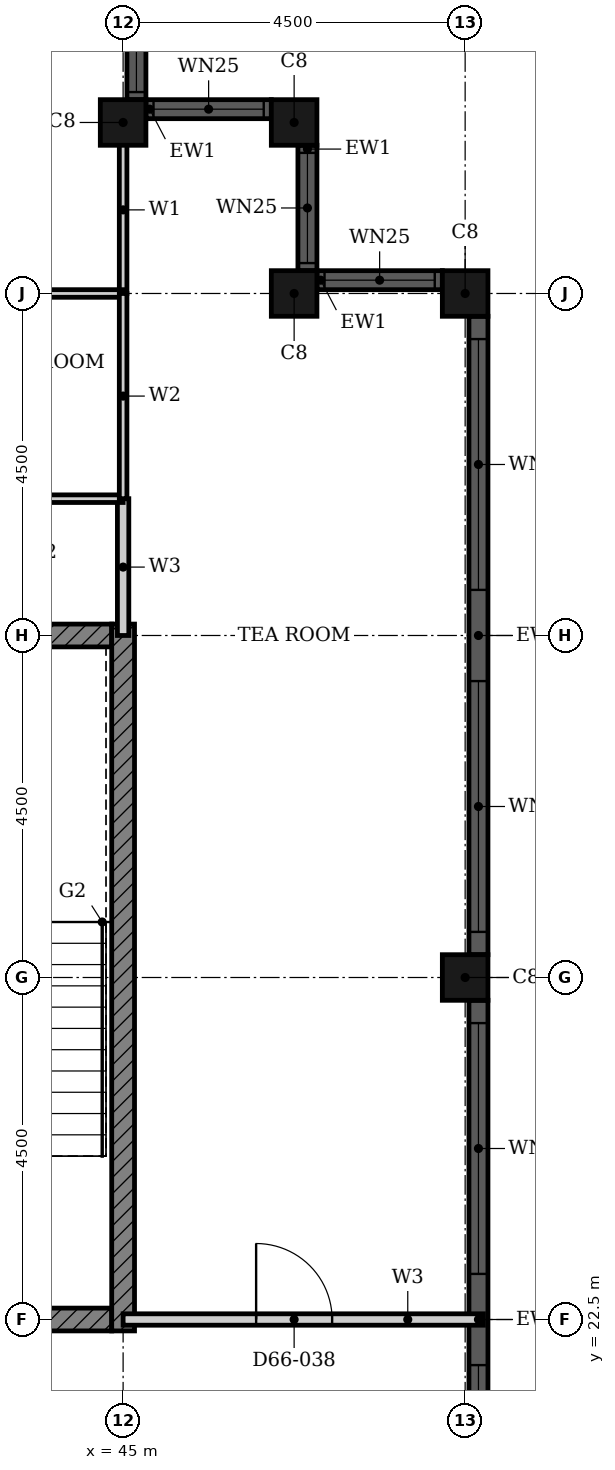
"""IFC4 building model, lengths in metres.
Left out: names, types, materials, properties, quantities, classifications, styles, units other than length and angle.
Written with IfcOpenShell. Run it as: python <this file> out.ifc"""

import sys

from ifc_helpers import new_model, si_unit, direction, frame, frame_2d, origin, origin_2d, place, context, subcontext, project, spatial, rectangle, hollow_rectangle, extrude, element, fill, save


model = new_model("IFC4")
c1 = context("Model", 3, precision=1e-05, world=origin(), true_north=direction((0.0, 1.0)))
c2 = subcontext(c1, "Body", "Model", "MODEL_VIEW")
j1 = project(units=[si_unit("LENGTHUNIT", "METRE"), si_unit("PLANEANGLEUNIT", "RADIAN")], contexts=[c1])
p1 = place(None, origin())
s1 = spatial("IfcSite", under=j1, at=p1, CompositionType="ELEMENT")
p2 = place(p1, origin())
s2 = spatial("IfcBuilding", under=s1, at=p2, CompositionType="ELEMENT")
p3 = place(p2, frame((0.0, 0.0, 260.1)))
s3 = spatial("IfcBuildingStorey", under=s2, at=p3, CompositionType="ELEMENT", Elevation=260.1)
for number, where, z_axis, x_axis in (
    (1, (49.5, 27.0, 0.0), (0.0, 0.0, 1.0), (1.0, 0.0, 0.0)),
    (2, (49.5, 36.0, 0.0), (0.0, 0.0, 1.0), (1.0, 0.0, 0.0)),
    (3, (47.25, 36.0, 0.0), (0.0, 0.0, 1.0), (1.0, 0.0, 0.0)),
    (4, (47.25, 38.25, 0.0), (0.0, 0.0, 1.0), (1.0, 0.0, 0.0)),
    (5, (45.0, 38.25, 0.0), (0.0, 0.0, 1.0), (1.0, 0.0, 0.0)),
):
    element("IfcColumn", number, at=place(p3, frame(where, z_axis=z_axis, x_axis=x_axis)), inside=s3, PredefinedType="COLUMN", context=c2, shape_type="SweptSolid", body=[
        extrude(hollow_rectangle(XDim=0.6, YDim=0.6, WallThickness=0.02, at=origin_2d()), origin(), (0.0, 0.0, 1.0), 3.7),
    ])
p4 = place(p3, frame((49.675, 18.3, 0.0), z_axis=(0.0, 0.0, 1.0), x_axis=(0.0, 1.0, 0.0)))
e6 = element("IfcWall", 6, at=p4, inside=s3, PredefinedType="SOLIDWALL", context=c2, shape_type="SweptSolid", body=[
    extrude(rectangle(XDim=8.4, YDim=0.25, at=frame_2d((4.2, 0.0))), origin(), (0.0, 0.0, 1.0), 3.7),
])
p5 = place(p4, frame((0.3, 0.0, 0.45)))
e7 = element("IfcOpeningElement", 7, at=p5, cuts=e6, PredefinedType="OPENING", context=c2, shape_type="SweptSolid", body=[
    extrude(rectangle(XDim=3.3, YDim=2.3, at=frame_2d((1.65, 1.15))), frame((0.0, 0.135, 0.0), z_axis=(0.0, -1.0, 0.0), x_axis=(1.0, 0.0, 0.0)), (0.0, 0.0, 1.0), 0.27),
])
p6 = place(p4, frame((4.8, 0.0, 0.45)))
e8 = element("IfcOpeningElement", 8, at=p6, cuts=e6, PredefinedType="OPENING", context=c2, shape_type="SweptSolid", body=[
    extrude(rectangle(XDim=3.3, YDim=2.3, at=frame_2d((1.65, 1.15))), frame((0.0, 0.135, 0.0), z_axis=(0.0, -1.0, 0.0), x_axis=(1.0, 0.0, 0.0)), (0.0, 0.0, 1.0), 0.27),
])
p7 = place(p3, frame((49.675, 27.3, 0.0), z_axis=(0.0, 0.0, 1.0), x_axis=(0.0, 1.0, 0.0)))
e9 = element("IfcWall", 9, at=p7, inside=s3, PredefinedType="SOLIDWALL", context=c2, shape_type="SweptSolid", body=[
    extrude(rectangle(XDim=8.4, YDim=0.25, at=frame_2d((4.2, 0.0))), origin(), (0.0, 0.0, 1.0), 3.7),
])
p8 = place(p7, frame((0.3, 0.0, 0.45)))
e10 = element("IfcOpeningElement", 10, at=p8, cuts=e9, PredefinedType="OPENING", context=c2, shape_type="SweptSolid", body=[
    extrude(rectangle(XDim=3.3, YDim=2.3, at=frame_2d((1.65, 1.15))), frame((0.0, 0.135, 0.0), z_axis=(0.0, -1.0, 0.0), x_axis=(1.0, 0.0, 0.0)), (0.0, 0.0, 1.0), 0.27),
])
p9 = place(p7, frame((4.8, 0.0, 0.45)))
e11 = element("IfcOpeningElement", 11, at=p9, cuts=e9, PredefinedType="OPENING", context=c2, shape_type="SweptSolid", body=[
    extrude(rectangle(XDim=3.3, YDim=2.3, at=frame_2d((1.65, 1.15))), frame((0.0, 0.135, 0.0), z_axis=(0.0, -1.0, 0.0), x_axis=(1.0, 0.0, 0.0)), (0.0, 0.0, 1.0), 0.27),
])
p10 = place(p3, frame((49.2, 36.175, 0.0), z_axis=(0.0, 0.0, 1.0), x_axis=(-1.0, 0.0, 0.0)))
e12 = element("IfcWall", 12, at=p10, inside=s3, PredefinedType="SOLIDWALL", context=c2, shape_type="SweptSolid", body=[
    extrude(rectangle(XDim=1.65, YDim=0.25, at=frame_2d((0.825, 0.0))), origin(), (0.0, 0.0, 1.0), 3.7),
])
p11 = place(p10, frame((0.1, 0.0, 0.9)))
e13 = element("IfcOpeningElement", 13, at=p11, cuts=e12, PredefinedType="OPENING", context=c2, shape_type="SweptSolid", body=[
    extrude(rectangle(XDim=1.45, YDim=1.85, at=frame_2d((0.725, 0.925))), frame((0.0, 0.135, 0.0), z_axis=(0.0, -1.0, 0.0), x_axis=(1.0, 0.0, 0.0)), (0.0, 0.0, 1.0), 0.27),
])
p12 = place(p3, frame((47.425, 36.3, 0.0), z_axis=(0.0, 0.0, 1.0), x_axis=(0.0, 1.0, 0.0)))
e14 = element("IfcWall", 14, at=p12, inside=s3, PredefinedType="SOLIDWALL", context=c2, shape_type="SweptSolid", body=[
    extrude(rectangle(XDim=1.65, YDim=0.25, at=frame_2d((0.825, 0.0))), origin(), (0.0, 0.0, 1.0), 3.7),
])
p13 = place(p12, frame((0.1, 0.0, 0.9)))
e15 = element("IfcOpeningElement", 15, at=p13, cuts=e14, PredefinedType="OPENING", context=c2, shape_type="SweptSolid", body=[
    extrude(rectangle(XDim=1.45, YDim=1.85, at=frame_2d((0.725, 0.925))), frame((0.0, 0.135, 0.0), z_axis=(0.0, -1.0, 0.0), x_axis=(1.0, 0.0, 0.0)), (0.0, 0.0, 1.0), 0.27),
])
p14 = place(p3, frame((46.95, 38.425, 0.0), z_axis=(0.0, 0.0, 1.0), x_axis=(-1.0, 0.0, 0.0)))
e16 = element("IfcWall", 16, at=p14, inside=s3, PredefinedType="SOLIDWALL", context=c2, shape_type="SweptSolid", body=[
    extrude(rectangle(XDim=1.65, YDim=0.25, at=frame_2d((0.825, 0.0))), origin(), (0.0, 0.0, 1.0), 3.7),
])
p15 = place(p14, frame((0.1, 0.0, 0.9)))
e17 = element("IfcOpeningElement", 17, at=p15, cuts=e16, PredefinedType="OPENING", context=c2, shape_type="SweptSolid", body=[
    extrude(rectangle(XDim=1.45, YDim=1.85, at=frame_2d((0.725, 0.925))), frame((0.0, 0.135, 0.0), z_axis=(0.0, -1.0, 0.0), x_axis=(1.0, 0.0, 0.0)), (0.0, 0.0, 1.0), 0.27),
])
p16 = place(p3, frame((45.175, 38.55, 0.0), z_axis=(0.0, 0.0, 1.0), x_axis=(0.0, 1.0, 0.0)))
e18 = element("IfcWall", 18, at=p16, inside=s3, PredefinedType="SOLIDWALL", context=c2, shape_type="SweptSolid", body=[
    extrude(rectangle(XDim=1.65, YDim=0.25, at=frame_2d((0.825, 0.0))), origin(), (0.0, 0.0, 1.0), 3.7),
])
p17 = place(p16, frame((0.1, 0.0, 0.9)))
e19 = element("IfcOpeningElement", 19, at=p17, cuts=e18, PredefinedType="OPENING", context=c2, shape_type="SweptSolid", body=[
    extrude(rectangle(XDim=1.45, YDim=1.85, at=frame_2d((0.725, 0.925))), frame((0.0, 0.135, 0.0), z_axis=(0.0, -1.0, 0.0), x_axis=(1.0, 0.0, 0.0)), (0.0, 0.0, 1.0), 0.27),
])
p18 = place(p3, frame((30.339, 22.5, 0.0), z_axis=(0.0, 0.0, 1.0), x_axis=(1.0, 0.0, 0.0)))
e20 = element("IfcWall", 20, at=p18, inside=s3, PredefinedType="SHEAR", context=c2, shape_type="SweptSolid", body=[
    extrude(rectangle(XDim=14.511, YDim=0.3, at=frame_2d((7.255, 0.0))), origin(), (0.0, 0.0, 1.0), 3.4),
])
p19 = place(p18, frame((7.975, 0.0, 0.0)))
e21 = element("IfcOpeningElement", 21, at=p19, cuts=e20, PredefinedType="OPENING", context=c2, shape_type="SweptSolid", body=[
    extrude(rectangle(XDim=1.8, YDim=2.1, at=frame_2d((0.9, 1.05))), frame((0.0, 0.16, 0.0), z_axis=(0.0, -1.0, 0.0), x_axis=(1.0, 0.0, 0.0)), (0.0, 0.0, 1.0), 0.32),
])
p20 = place(p3, frame((40.625, 31.5, 0.0), z_axis=(0.0, 0.0, 1.0), x_axis=(1.0, 0.0, 0.0)))
e22 = element("IfcWall", 22, at=p20, inside=s3, PredefinedType="SHEAR", context=c2, shape_type="SweptSolid", body=[
    extrude(rectangle(XDim=4.225, YDim=0.3, at=frame_2d((2.113, 0.0))), origin(), (0.0, 0.0, 1.0), 3.4),
])
p21 = place(p3, frame((45.0, 22.35, 0.0), z_axis=(0.0, 0.0, 1.0), x_axis=(0.0, 1.0, 0.0)))
e23 = element("IfcWall", 23, at=p21, inside=s3, PredefinedType="SHEAR", context=c2, shape_type="SweptSolid", body=[
    extrude(rectangle(XDim=9.3, YDim=0.3, at=frame_2d((4.65, 0.0))), origin(), (0.0, 0.0, 1.0), 3.4),
])
p22 = place(p3, frame((45.0, 22.5, 0.0), z_axis=(0.0, 0.0, 1.0), x_axis=(1.0, 0.0, 0.0)))
e24 = element("IfcWall", 24, at=p22, inside=s3, PredefinedType="PARTITIONING", context=c2, shape_type="SweptSolid", body=[
    extrude(rectangle(XDim=4.74, YDim=0.15, at=frame_2d((2.37, 0.0))), origin(), (0.0, 0.0, 1.0), 3.4),
])
p23 = place(p22, frame((1.75, 0.0, 0.0)))
e25 = element("IfcOpeningElement", 25, at=p23, cuts=e24, PredefinedType="OPENING", context=c2, shape_type="SweptSolid", body=[
    extrude(rectangle(XDim=1.0, YDim=2.1, at=frame_2d((0.5, 1.05))), frame((0.0, 0.085, 0.0), z_axis=(0.0, -1.0, 0.0), x_axis=(1.0, 0.0, 0.0)), (0.0, 0.0, 1.0), 0.17),
])
p24 = place(p3, frame((45.0, 31.5, 0.0), z_axis=(0.0, 0.0, 1.0), x_axis=(0.0, 1.0, 0.0)))
e26 = element("IfcWall", 26, at=p24, inside=s3, PredefinedType="PARTITIONING", context=c2, shape_type="SweptSolid", body=[
    extrude(rectangle(XDim=1.8, YDim=0.15, at=frame_2d((0.9, 0.0))), origin(), (0.0, 0.0, 1.0), 3.4),
])
p25 = place(p3, frame((45.0, 36.0, 0.0), z_axis=(0.0, 0.0, 1.0), x_axis=(0.0, 1.0, 0.0)))
e27 = element("IfcWall", 27, at=p25, inside=s3, PredefinedType="PARTITIONING", context=c2, shape_type="SweptSolid", body=[
    extrude(rectangle(XDim=2.2, YDim=0.1, at=frame_2d((1.1, 0.0))), origin(), (0.0, 0.0, 1.0), 3.4),
])
for number, where, z_axis, x_axis in (
    (28, (42.6, 33.3, 0.0), (0.0, 0.0, 1.0), (1.0, 0.0, 0.0)),
    (29, (42.6, 36.0, 0.0), (0.0, 0.0, 1.0), (1.0, 0.0, 0.0)),
):
    element("IfcWall", number, at=place(p3, frame(where, z_axis=z_axis, x_axis=x_axis)), inside=s3, PredefinedType="PARTITIONING", context=c2, shape_type="SweptSolid", body=[
        extrude(rectangle(XDim=2.4, YDim=0.1, at=frame_2d((1.2, 0.0))), origin(), (0.0, 0.0, 1.0), 3.4),
    ])
p26 = place(p3, frame((45.0, 33.3, 0.0), z_axis=(0.0, 0.0, 1.0), x_axis=(0.0, 1.0, 0.0)))
e30 = element("IfcWall", 30, at=p26, inside=s3, PredefinedType="PARTITIONING", context=c2, shape_type="SweptSolid", body=[
    extrude(rectangle(XDim=2.7, YDim=0.1, at=frame_2d((1.35, 0.0))), origin(), (0.0, 0.0, 1.0), 3.4),
])
p27 = place(p5, origin())
e31 = element("IfcWindow", 31, at=p27, inside=s3, PartitioningType="SINGLE_PANEL", PredefinedType="WINDOW", context=c2, shape_type="SweptSolid", body=[
    extrude(rectangle(XDim=3.3, YDim=2.3, at=frame_2d((1.65, 1.15))), frame((0.0, 0.03, 0.0), z_axis=(0.0, -1.0, 0.0), x_axis=(1.0, 0.0, 0.0)), (0.0, 0.0, 1.0), 0.06),
])
fill(e7, e31)
p28 = place(p6, origin())
e32 = element("IfcWindow", 32, at=p28, inside=s3, PartitioningType="SINGLE_PANEL", PredefinedType="WINDOW", context=c2, shape_type="SweptSolid", body=[
    extrude(rectangle(XDim=3.3, YDim=2.3, at=frame_2d((1.65, 1.15))), frame((0.0, 0.03, 0.0), z_axis=(0.0, -1.0, 0.0), x_axis=(1.0, 0.0, 0.0)), (0.0, 0.0, 1.0), 0.06),
])
fill(e8, e32)
p29 = place(p8, origin())
e33 = element("IfcWindow", 33, at=p29, inside=s3, PartitioningType="SINGLE_PANEL", PredefinedType="WINDOW", context=c2, shape_type="SweptSolid", body=[
    extrude(rectangle(XDim=3.3, YDim=2.3, at=frame_2d((1.65, 1.15))), frame((0.0, 0.03, 0.0), z_axis=(0.0, -1.0, 0.0), x_axis=(1.0, 0.0, 0.0)), (0.0, 0.0, 1.0), 0.06),
])
fill(e10, e33)
p30 = place(p9, origin())
e34 = element("IfcWindow", 34, at=p30, inside=s3, PartitioningType="SINGLE_PANEL", PredefinedType="WINDOW", context=c2, shape_type="SweptSolid", body=[
    extrude(rectangle(XDim=3.3, YDim=2.3, at=frame_2d((1.65, 1.15))), frame((0.0, 0.03, 0.0), z_axis=(0.0, -1.0, 0.0), x_axis=(1.0, 0.0, 0.0)), (0.0, 0.0, 1.0), 0.06),
])
fill(e11, e34)
p31 = place(p11, origin())
e35 = element("IfcWindow", 35, at=p31, inside=s3, PartitioningType="SINGLE_PANEL", PredefinedType="WINDOW", context=c2, shape_type="SweptSolid", body=[
    extrude(rectangle(XDim=1.45, YDim=1.85, at=frame_2d((0.725, 0.925))), frame((0.0, 0.03, 0.0), z_axis=(0.0, -1.0, 0.0), x_axis=(1.0, 0.0, 0.0)), (0.0, 0.0, 1.0), 0.06),
])
fill(e13, e35)
p32 = place(p13, origin())
e36 = element("IfcWindow", 36, at=p32, inside=s3, PartitioningType="SINGLE_PANEL", PredefinedType="WINDOW", context=c2, shape_type="SweptSolid", body=[
    extrude(rectangle(XDim=1.45, YDim=1.85, at=frame_2d((0.725, 0.925))), frame((0.0, 0.03, 0.0), z_axis=(0.0, -1.0, 0.0), x_axis=(1.0, 0.0, 0.0)), (0.0, 0.0, 1.0), 0.06),
])
fill(e15, e36)
p33 = place(p15, origin())
e37 = element("IfcWindow", 37, at=p33, inside=s3, PartitioningType="SINGLE_PANEL", PredefinedType="WINDOW", context=c2, shape_type="SweptSolid", body=[
    extrude(rectangle(XDim=1.45, YDim=1.85, at=frame_2d((0.725, 0.925))), frame((0.0, 0.03, 0.0), z_axis=(0.0, -1.0, 0.0), x_axis=(1.0, 0.0, 0.0)), (0.0, 0.0, 1.0), 0.06),
])
fill(e17, e37)
p34 = place(p17, origin())
e38 = element("IfcWindow", 38, at=p34, inside=s3, PartitioningType="SINGLE_PANEL", PredefinedType="WINDOW", context=c2, shape_type="SweptSolid", body=[
    extrude(rectangle(XDim=1.45, YDim=1.85, at=frame_2d((0.725, 0.925))), frame((0.0, 0.03, 0.0), z_axis=(0.0, -1.0, 0.0), x_axis=(1.0, 0.0, 0.0)), (0.0, 0.0, 1.0), 0.06),
])
fill(e19, e38)
p35 = place(p23, origin())
e39 = element("IfcDoor", 39, at=p35, inside=s3, OperationType="SINGLE_SWING_LEFT", PredefinedType="DOOR", context=c2, shape_type="SweptSolid", body=[
    extrude(rectangle(XDim=1.0, YDim=2.1, at=frame_2d((0.5, 1.05))), frame((0.0, 0.025, 0.0), z_axis=(0.0, -1.0, 0.0), x_axis=(1.0, 0.0, 0.0)), (0.0, 0.0, 1.0), 0.05),
])
fill(e25, e39)
save(model, sys.argv[1])
